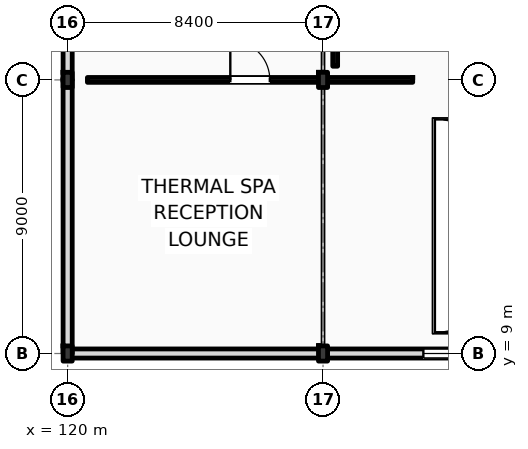
"""IFC4 building model, lengths in metres.
Left out: names, types, materials, properties, quantities, classifications, styles, units other than length and angle.
Written with IfcOpenShell. Run it as: python <this file> out.ifc"""

import sys

from ifc_helpers import new_model, si_unit, direction, frame, frame_2d, origin, origin_2d, place, context, subcontext, project, spatial, rectangle, i_section, extrude, element, fill, save


model = new_model("IFC4")
c1 = context("Model", 3, precision=1e-05, world=origin(), true_north=direction((0.0, 1.0)))
c2 = subcontext(c1, "Body", "Model", "MODEL_VIEW")
j1 = project(units=[si_unit("LENGTHUNIT", "METRE"), si_unit("PLANEANGLEUNIT", "RADIAN")], contexts=[c1])
p1 = place(None, origin())
s1 = spatial("IfcSite", under=j1, at=p1, CompositionType="ELEMENT")
p2 = place(p1, origin())
s2 = spatial("IfcBuilding", under=s1, at=p2, CompositionType="ELEMENT")
p3 = place(p2, origin())
s3 = spatial("IfcBuildingStorey", under=s2, at=p3, CompositionType="ELEMENT", Elevation=0.0)
for number, where, z_axis, x_axis in (
    (1, (120.0, 9.0, 0.0), (0.0, 0.0, 1.0), (1.0, 0.0, 0.0)),
    (2, (120.0, 18.0, 0.0), (0.0, 0.0, 1.0), (1.0, 0.0, 0.0)),
    (3, (128.4, 9.0, 0.0), (0.0, 0.0, 1.0), (1.0, 0.0, 0.0)),
    (4, (128.4, 18.0, 0.0), (0.0, 0.0, 1.0), (1.0, 0.0, 0.0)),
):
    element("IfcColumn", number, at=place(p3, frame(where, z_axis=z_axis, x_axis=x_axis)), inside=s3, PredefinedType="COLUMN", context=c2, shape_type="SweptSolid", body=[
        extrude(i_section(OverallWidth=0.3, OverallDepth=0.5, WebThickness=0.014, FlangeThickness=0.028, FilletRadius=0.027, at=origin_2d()), origin(), (0.0, 0.0, 1.0), 6.0),
    ])
p4 = place(p3, frame((120.0, 9.0, 0.0), z_axis=(0.0, 0.0, 1.0), x_axis=(1.0, 0.0, 0.0)))
e5 = element("IfcWall", 5, at=p4, inside=s3, PredefinedType="STANDARD", context=c2, shape_type="SweptSolid", body=[
    extrude(rectangle(XDim=8.4, YDim=0.3, at=frame_2d((4.2, 0.0))), origin(), (0.0, 0.0, 1.0), 5.14),
])
p5 = place(p3, frame((128.4, 9.0, 0.0), z_axis=(0.0, 0.0, 1.0), x_axis=(1.0, 0.0, 0.0)))
e6 = element("IfcWall", 6, at=p5, inside=s3, PredefinedType="STANDARD", context=c2, shape_type="SweptSolid", body=[
    extrude(rectangle(XDim=9.0, YDim=0.3, at=frame_2d((4.5, 0.0))), origin(), (0.0, 0.0, 1.0), 5.09),
])
p6 = place(p5, frame((3.3, 0.0, 1.05)))
e7 = element("IfcOpeningElement", 7, at=p6, cuts=e6, PredefinedType="OPENING", context=c2, shape_type="SweptSolid", body=[
    extrude(rectangle(XDim=2.4, YDim=2.6, at=frame_2d((1.2, 1.3))), frame((0.0, 0.16, 0.0), z_axis=(0.0, -1.0, 0.0), x_axis=(1.0, 0.0, 0.0)), (0.0, 0.0, 1.0), 0.32),
])
for number, where, z_axis, x_axis in (
    (8, (120.0, 9.0, 0.0), (0.0, 0.0, 1.0), (0.0, 1.0, 0.0)),
    (9, (120.0, 18.0, 0.0), (0.0, 0.0, 1.0), (0.0, 1.0, 0.0)),
):
    element("IfcWall", number, at=place(p3, frame(where, z_axis=z_axis, x_axis=x_axis)), inside=s3, PredefinedType="STANDARD", context=c2, shape_type="SweptSolid", body=[
        extrude(rectangle(XDim=9.0, YDim=0.3, at=frame_2d((4.5, 0.0))), origin(), (0.0, 0.0, 1.0), 5.2),
    ])
p7 = place(p3, frame((128.8, 18.45, 0.0), z_axis=(0.0, 0.0, 1.0), x_axis=(0.0, 1.0, 0.0)))
e10 = element("IfcWall", 10, at=p7, inside=s3, PredefinedType="PARTITIONING", context=c2, shape_type="SweptSolid", body=[
    extrude(rectangle(XDim=10.3, YDim=0.16, at=frame_2d((5.15, 0.0))), origin(), (0.0, 0.0, 1.0), 5.7),
])
p8 = place(p7, frame((4.7, 0.0, 0.0)))
e11 = element("IfcOpeningElement", 11, at=p8, cuts=e10, PredefinedType="OPENING", context=c2, shape_type="SweptSolid", body=[
    extrude(rectangle(XDim=0.9, YDim=2.1, at=frame_2d((0.45, 1.05))), frame((0.0, 0.09, 0.0), z_axis=(0.0, -1.0, 0.0), x_axis=(1.0, 0.0, 0.0)), (0.0, 0.0, 1.0), 0.18),
])
p9 = place(p3, frame((120.65, 18.0, 0.0), z_axis=(0.0, 0.0, 1.0), x_axis=(1.0, 0.0, 0.0)))
e12 = element("IfcWall", 12, at=p9, inside=s3, PredefinedType="PARTITIONING", context=c2, shape_type="SweptSolid", body=[
    extrude(rectangle(XDim=10.7, YDim=0.16, at=frame_2d((5.35, 0.0))), origin(), (0.0, 0.0, 1.0), 5.09),
])
p10 = place(p9, frame((4.7, 0.0, 0.0)))
e13 = element("IfcOpeningElement", 13, at=p10, cuts=e12, PredefinedType="OPENING", context=c2, shape_type="SweptSolid", body=[
    extrude(rectangle(XDim=1.3, YDim=2.2, at=frame_2d((0.65, 1.1))), frame((0.0, 0.09, 0.0), z_axis=(0.0, -1.0, 0.0), x_axis=(1.0, 0.0, 0.0)), (0.0, 0.0, 1.0), 0.18),
])
p11 = place(p6, origin())
e14 = element("IfcWindow", 14, at=p11, inside=s3, PartitioningType="DOUBLE_PANEL_VERTICAL", PredefinedType="WINDOW", context=c2, shape_type="SweptSolid", body=[
    extrude(rectangle(XDim=2.4, YDim=2.6, at=frame_2d((1.2, 1.3))), frame((0.0, 0.03, 0.0), z_axis=(0.0, -1.0, 0.0), x_axis=(1.0, 0.0, 0.0)), (0.0, 0.0, 1.0), 0.06),
])
fill(e7, e14)
p12 = place(p10, origin())
e15 = element("IfcDoor", 15, at=p12, inside=s3, OperationType="SINGLE_SWING_LEFT", PredefinedType="DOOR", context=c2, shape_type="SweptSolid", body=[
    extrude(rectangle(XDim=1.3, YDim=2.2, at=frame_2d((0.65, 1.1))), frame((0.0, 0.025, 0.0), z_axis=(0.0, -1.0, 0.0), x_axis=(1.0, 0.0, 0.0)), (0.0, 0.0, 1.0), 0.05),
])
fill(e13, e15)
save(model, sys.argv[1])
